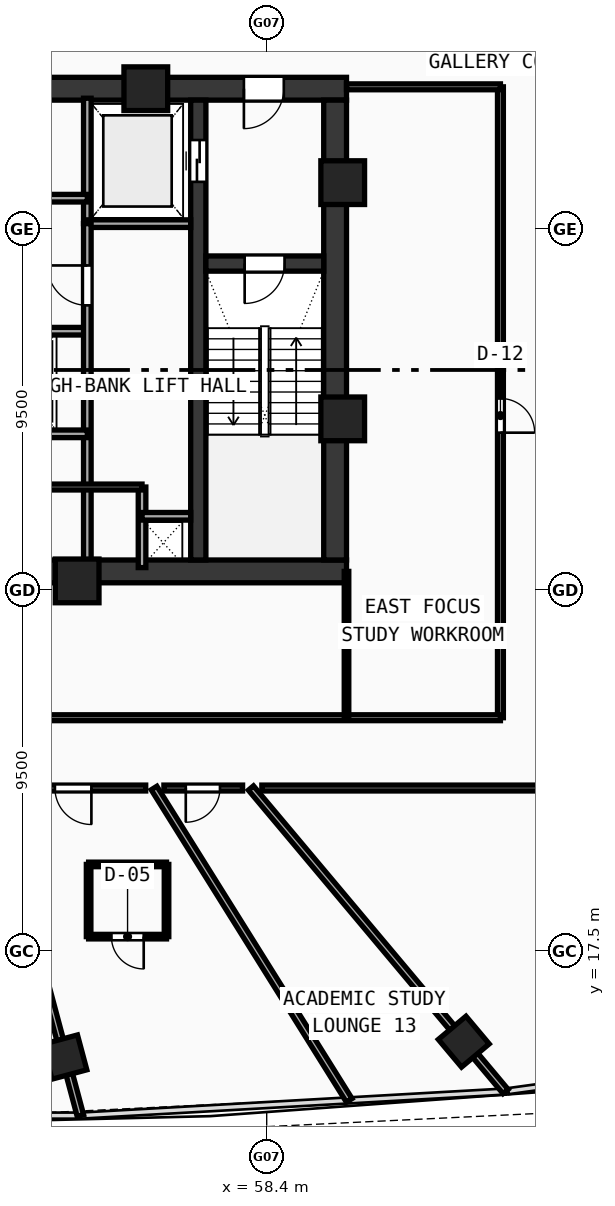
"""IFC4 building model, lengths in metres.
Left out: names, types, materials, properties, quantities, classifications, styles, units other than length and angle.
Written with IfcOpenShell. Run it as: python <this file> out.ifc"""

import sys

from ifc_helpers import new_model, si_unit, direction, frame, frame_2d, origin, origin_with_axes, origin_2d, place, context, subcontext, project, spatial, rectangle, hollow_rectangle, extrude, source, transform, mapped, element, fill, save


model = new_model("IFC4")
c1 = context("Model", 3, precision=1e-05, world=origin(), true_north=direction((0.0, 1.0)))
c2 = subcontext(c1, "Body", "Model", "MODEL_VIEW")
j1 = project(units=[si_unit("LENGTHUNIT", "METRE"), si_unit("PLANEANGLEUNIT", "RADIAN")], contexts=[c1])
p1 = place(None, origin())
s1 = spatial("IfcSite", under=j1, at=p1, CompositionType="ELEMENT")
p2 = place(p1, origin())
s2 = spatial("IfcBuilding", under=s1, at=p2, CompositionType="ELEMENT")
p3 = place(p2, frame((0.0, 0.0, 140.87)))
s3 = spatial("IfcBuildingStorey", under=s2, at=p3, CompositionType="ELEMENT", Elevation=140.87)
p4 = place(p3, frame((35.5, 27.5, 0.0), z_axis=(0.0, 0.0, 1.0), x_axis=(1.0, 0.0, 0.0)))
e1 = element("IfcWall", 1, at=p4, inside=s3, PredefinedType="SHEAR", context=c2, shape_type="SweptSolid", body=[
    extrude(rectangle(XDim=25.0, YDim=0.6, at=frame_2d((12.5, 0.0))), origin(), (0.0, 0.0, 1.0), 3.42),
])
p5 = place(p3, frame((49.2, 40.2, 0.0), z_axis=(0.0, 0.0, 1.0), x_axis=(1.0, 0.0, 0.0)))
e2 = element("IfcWall", 2, at=p5, inside=s3, PredefinedType="SHEAR", context=c2, shape_type="SweptSolid", body=[
    extrude(rectangle(XDim=11.3, YDim=0.6, at=frame_2d((5.65, 0.0))), origin(), (0.0, 0.0, 1.0), 3.42),
])
p6 = place(p5, frame((8.6, 0.0, 0.0)))
e3 = element("IfcOpeningElement", 3, at=p6, cuts=e2, PredefinedType="OPENING", context=c2, shape_type="SweptSolid", body=[
    extrude(rectangle(XDim=1.05, YDim=2.1, at=frame_2d((0.525, 1.05))), frame((0.0, 0.31, 0.0), z_axis=(0.0, -1.0, 0.0), x_axis=(1.0, 0.0, 0.0)), (0.0, 0.0, 1.0), 0.62),
])
p7 = place(p3, frame((60.2, 27.8, 0.0), z_axis=(0.0, 0.0, 1.0), x_axis=(0.0, 1.0, 0.0)))
e4 = element("IfcWall", 4, at=p7, inside=s3, PredefinedType="SHEAR", context=c2, shape_type="SweptSolid", body=[
    extrude(rectangle(XDim=12.1, YDim=0.6, at=frame_2d((6.05, 0.0))), origin(), (0.0, 0.0, 1.0), 3.42),
])
p8 = place(p3, frame((56.6, 27.8, 0.0), z_axis=(0.0, 0.0, 1.0), x_axis=(0.0, 1.0, 0.0)))
e5 = element("IfcWall", 5, at=p8, inside=s3, PredefinedType="SHEAR", context=c2, shape_type="SweptSolid", body=[
    extrude(rectangle(XDim=12.1, YDim=0.4, at=frame_2d((6.05, 0.0))), origin(), (0.0, 0.0, 1.0), 3.42),
])
p9 = place(p8, frame((9.95, 0.0, 0.0)))
e6 = element("IfcOpeningElement", 6, at=p9, cuts=e5, PredefinedType="OPENING", context=c2, shape_type="SweptSolid", body=[
    extrude(rectangle(XDim=1.1, YDim=2.1, at=frame_2d((0.55, 1.05))), frame((0.0, 0.21, 0.0), z_axis=(0.0, -1.0, 0.0), x_axis=(1.0, 0.0, 0.0)), (0.0, 0.0, 1.0), 0.42),
])
p10 = place(p3, frame((56.8, 35.6, 0.0), z_axis=(0.0, 0.0, 1.0), x_axis=(1.0, 0.0, 0.0)))
e7 = element("IfcWall", 7, at=p10, inside=s3, PredefinedType="SHEAR", context=c2, shape_type="SweptSolid", body=[
    extrude(rectangle(XDim=3.1, YDim=0.4, at=frame_2d((1.55, 0.0))), origin(), (0.0, 0.0, 1.0), 3.42),
])
p11 = place(p10, frame((1.02, 0.0, 0.0)))
e8 = element("IfcOpeningElement", 8, at=p11, cuts=e7, PredefinedType="OPENING", context=c2, shape_type="SweptSolid", body=[
    extrude(rectangle(XDim=1.05, YDim=2.1, at=frame_2d((0.525, 1.05))), frame((0.0, 0.21, 0.0), z_axis=(0.0, -1.0, 0.0), x_axis=(1.0, 0.0, 0.0)), (0.0, 0.0, 1.0), 0.42),
])
m1 = source(origin(), c2, "Body", "SweptSolid", [
    extrude(hollow_rectangle(XDim=1.15, YDim=1.15, WallThickness=0.048, at=origin_2d()), origin(), (0.0, 0.0, 1.0), 3.68),
])
for number, where, z_axis, x_axis in (
    (9, (53.412, 27.25, -0.26), (0.0, 0.0, 1.0), (1.0, 0.0, 0.0)),
    (10, (60.4, 31.513, -0.26), (0.0, 0.0, 1.0), (1.0, 0.0, 0.0)),
    (11, (60.4, 37.729, -0.26), (0.0, 0.0, 1.0), (1.0, 0.0, 0.0)),
    (12, (55.219, 40.2, -0.26), (0.0, 0.0, 1.0), (1.0, 0.0, 0.0)),
):
    element("IfcColumn", number, at=place(p3, frame(where, z_axis=z_axis, x_axis=x_axis)), inside=s3, PredefinedType="COLUMN", context=c2, shape_type="MappedRepresentation", body=[
        mapped(m1, transform((0.0, 0.0, 0.0), scale=1.0)),
    ])
m2 = source(origin(), c2, "Body", "SweptSolid", [
    extrude(hollow_rectangle(XDim=0.95, YDim=0.95, WallThickness=0.04, at=origin_2d()), origin(), (0.0, 0.0, 1.0), 3.68),
])
for number, where, z_axis, x_axis in (
    (13, (53.085, 14.722, -0.26), (0.0, 0.0, 1.0), (0.966, 0.259, 0.0)),
    (14, (63.585, 15.126, -0.26), (0.0, 0.0, 1.0), (0.766, 0.643, 0.0)),
):
    element("IfcColumn", number, at=place(p3, frame(where, z_axis=z_axis, x_axis=x_axis)), inside=s3, PredefinedType="COLUMN", context=c2, shape_type="MappedRepresentation", body=[
        mapped(m2, transform((0.0, 0.0, 0.0), scale=1.0)),
    ])
p12 = place(p3, frame((53.68, 36.65, 0.0), z_axis=(0.0, 0.0, 1.0), x_axis=(0.0, 1.0, 0.0)))
e15 = element("IfcWall", 15, at=p12, inside=s3, PredefinedType="SOLIDWALL", context=c2, shape_type="SweptSolid", body=[
    extrude(rectangle(XDim=3.3, YDim=0.2, at=frame_2d((1.65, 0.0))), origin(), (0.0, 0.0, 1.0), 3.42),
])
p13 = place(p3, frame((53.68, 36.65, 0.0), z_axis=(0.0, 0.0, 1.0), x_axis=(1.0, 0.0, 0.0)))
e16 = element("IfcWall", 16, at=p13, inside=s3, PredefinedType="SOLIDWALL", context=c2, shape_type="SweptSolid", body=[
    extrude(rectangle(XDim=2.72, YDim=0.2, at=frame_2d((1.36, 0.0))), origin(), (0.0, 0.0, 1.0), 3.42),
])
p14 = place(p3, frame((48.95, 37.32, 0.0), z_axis=(0.0, 0.0, 1.0), x_axis=(1.0, 0.0, 0.0)))
e17 = element("IfcWall", 17, at=p14, inside=s3, PredefinedType="SOLIDWALL", context=c2, shape_type="SweptSolid", body=[
    extrude(rectangle(XDim=4.73, YDim=0.2, at=frame_2d((2.365, 0.0))), origin(), (0.0, 0.0, 1.0), 3.42),
])
p15 = place(p14, frame((1.8, 0.0, 0.0)))
e18 = element("IfcOpeningElement", 18, at=p15, cuts=e17, PredefinedType="OPENING", context=c2, shape_type="SweptSolid", body=[
    extrude(rectangle(XDim=0.9, YDim=2.1, at=frame_2d((0.45, 1.05))), frame((0.0, 0.11, 0.0), z_axis=(0.0, -1.0, 0.0), x_axis=(1.0, 0.0, 0.0)), (0.0, 0.0, 1.0), 0.22),
])
p16 = place(p3, frame((43.85, 33.82, 0.0), z_axis=(0.0, 0.0, 1.0), x_axis=(1.0, 0.0, 0.0)))
e19 = element("IfcWall", 19, at=p16, inside=s3, PredefinedType="SOLIDWALL", context=c2, shape_type="SweptSolid", body=[
    extrude(rectangle(XDim=9.83, YDim=0.2, at=frame_2d((4.915, 0.0))), origin(), (0.0, 0.0, 1.0), 3.42),
])
p17 = place(p16, frame((0.575, 0.0, 0.0)))
e20 = element("IfcOpeningElement", 20, at=p17, cuts=e19, PredefinedType="OPENING", context=c2, shape_type="SweptSolid", body=[
    extrude(rectangle(XDim=1.05, YDim=2.1, at=frame_2d((0.525, 1.05))), frame((0.0, 0.11, 0.0), z_axis=(0.0, -1.0, 0.0), x_axis=(1.0, 0.0, 0.0)), (0.0, 0.0, 1.0), 0.22),
])
p18 = place(p16, frame((2.875, 0.0, 0.0)))
e21 = element("IfcOpeningElement", 21, at=p18, cuts=e19, PredefinedType="OPENING", context=c2, shape_type="SweptSolid", body=[
    extrude(rectangle(XDim=1.05, YDim=2.1, at=frame_2d((0.525, 1.05))), frame((0.0, 0.11, 0.0), z_axis=(0.0, -1.0, 0.0), x_axis=(1.0, 0.0, 0.0)), (0.0, 0.0, 1.0), 0.22),
])
p19 = place(p16, frame((5.175, 0.0, 0.0)))
e22 = element("IfcOpeningElement", 22, at=p19, cuts=e19, PredefinedType="OPENING", context=c2, shape_type="SweptSolid", body=[
    extrude(rectangle(XDim=1.05, YDim=2.1, at=frame_2d((0.525, 1.05))), frame((0.0, 0.11, 0.0), z_axis=(0.0, -1.0, 0.0), x_axis=(1.0, 0.0, 0.0)), (0.0, 0.0, 1.0), 0.22),
])
p20 = place(p16, frame((7.475, 0.0, 0.0)))
e23 = element("IfcOpeningElement", 23, at=p20, cuts=e19, PredefinedType="OPENING", context=c2, shape_type="SweptSolid", body=[
    extrude(rectangle(XDim=1.05, YDim=2.1, at=frame_2d((0.525, 1.05))), frame((0.0, 0.11, 0.0), z_axis=(0.0, -1.0, 0.0), x_axis=(1.0, 0.0, 0.0)), (0.0, 0.0, 1.0), 0.22),
])
p21 = place(p3, frame((53.68, 27.6, 0.0), z_axis=(0.0, 0.0, 1.0), x_axis=(0.0, 1.0, 0.0)))
e24 = element("IfcWall", 24, at=p21, inside=s3, PredefinedType="SOLIDWALL", context=c2, shape_type="SweptSolid", body=[
    extrude(rectangle(XDim=9.05, YDim=0.2, at=frame_2d((4.525, 0.0))), origin(), (0.0, 0.0, 1.0), 3.42),
])
p22 = place(p21, frame((6.9, 0.0, 0.0)))
e25 = element("IfcOpeningElement", 25, at=p22, cuts=e24, PredefinedType="OPENING", context=c2, shape_type="SweptSolid", body=[
    extrude(rectangle(XDim=1.05, YDim=2.1, at=frame_2d((0.525, 1.05))), frame((0.0, 0.11, 0.0), z_axis=(0.0, -1.0, 0.0), x_axis=(1.0, 0.0, 0.0)), (0.0, 0.0, 1.0), 0.22),
])
p23 = place(p3, frame((43.85, 31.12, 0.0), z_axis=(0.0, 0.0, 1.0), x_axis=(1.0, 0.0, 0.0)))
e26 = element("IfcWall", 26, at=p23, inside=s3, PredefinedType="SOLIDWALL", context=c2, shape_type="SweptSolid", body=[
    extrude(rectangle(XDim=9.83, YDim=0.2, at=frame_2d((4.915, 0.0))), origin(), (0.0, 0.0, 1.0), 3.42),
])
p24 = place(p3, frame((55.12, 27.6, 0.0), z_axis=(0.0, 0.0, 1.0), x_axis=(0.0, 1.0, 0.0)))
e27 = element("IfcWall", 27, at=p24, inside=s3, PredefinedType="SOLIDWALL", context=c2, shape_type="SweptSolid", body=[
    extrude(rectangle(XDim=2.12, YDim=0.2, at=frame_2d((1.06, 0.0))), origin(), (0.0, 0.0, 1.0), 3.42),
])
p25 = place(p3, frame((55.12, 28.95, 0.0), z_axis=(0.0, 0.0, 1.0), x_axis=(1.0, 0.0, 0.0)))
e28 = element("IfcWall", 28, at=p25, inside=s3, PredefinedType="SOLIDWALL", context=c2, shape_type="SweptSolid", body=[
    extrude(rectangle(XDim=1.28, YDim=0.2, at=frame_2d((0.64, 0.0))), origin(), (0.0, 0.0, 1.0), 3.42),
])
p26 = place(p3, frame((51.05, 29.72, 0.0), z_axis=(0.0, 0.0, 1.0), x_axis=(1.0, 0.0, 0.0)))
e29 = element("IfcWall", 29, at=p26, inside=s3, PredefinedType="PARTITIONING", context=c2, shape_type="SweptSolid", body=[
    extrude(rectangle(XDim=4.07, YDim=0.155, at=frame_2d((2.035, 0.0))), origin(), (0.0, 0.0, 1.0), 3.42),
])
p27 = place(p26, frame((0.5, 0.0, 0.0)))
e30 = element("IfcOpeningElement", 30, at=p27, cuts=e29, PredefinedType="OPENING", context=c2, shape_type="SweptSolid", body=[
    extrude(rectangle(XDim=0.9, YDim=2.1, at=frame_2d((0.45, 1.05))), frame((0.0, 0.087, 0.0), z_axis=(0.0, -1.0, 0.0), x_axis=(1.0, 0.0, 0.0)), (0.0, 0.0, 1.0), 0.175),
])
p28 = place(p3, frame((64.55, 23.65, 0.0), z_axis=(0.0, 0.0, 1.0), x_axis=(0.0, 1.0, 0.0)))
e31 = element("IfcWall", 31, at=p28, inside=s3, PredefinedType="PARTITIONING", context=c2, shape_type="SweptSolid", body=[
    extrude(rectangle(XDim=16.6, YDim=0.155, at=frame_2d((8.3, 0.0))), origin(), (0.0, 0.0, 1.0), 2.77),
])
p29 = place(p28, frame((7.5, 0.0, 0.0)))
e32 = element("IfcOpeningElement", 32, at=p29, cuts=e31, PredefinedType="OPENING", context=c2, shape_type="SweptSolid", body=[
    extrude(rectangle(XDim=0.9, YDim=2.08, at=frame_2d((0.45, 1.04))), frame((0.0, 0.087, 0.0), z_axis=(0.0, -1.0, 0.0), x_axis=(1.0, 0.0, 0.0)), (0.0, 0.0, 1.0), 0.175),
])
p30 = place(p3, frame((31.45, 23.65, 0.0), z_axis=(0.0, 0.0, 1.0), x_axis=(1.0, 0.0, 0.0)))
e33 = element("IfcWall", 33, at=p30, inside=s3, PredefinedType="PARTITIONING", context=c2, shape_type="SweptSolid", body=[
    extrude(rectangle(XDim=33.1, YDim=0.155, at=frame_2d((16.55, 0.0))), origin(), (0.0, 0.0, 1.0), 2.77),
])
p31 = place(p30, frame((16.0, 0.0, 0.0)))
e34 = element("IfcOpeningElement", 34, at=p31, cuts=e33, PredefinedType="OPENING", context=c2, shape_type="SweptSolid", body=[
    extrude(rectangle(XDim=0.92, YDim=2.1, at=frame_2d((0.46, 1.05))), frame((0.0, 0.087, 0.0), z_axis=(0.0, -1.0, 0.0), x_axis=(1.0, 0.0, 0.0)), (0.0, 0.0, 1.0), 0.175),
])
p32 = place(p3, frame((60.5, 40.25, 0.0), z_axis=(0.0, 0.0, 1.0), x_axis=(1.0, 0.0, 0.0)))
e35 = element("IfcWall", 35, at=p32, inside=s3, PredefinedType="PARTITIONING", context=c2, shape_type="SweptSolid", body=[
    extrude(rectangle(XDim=4.05, YDim=0.155, at=frame_2d((2.025, 0.0))), origin(), (0.0, 0.0, 1.0), 3.42),
])
p33 = place(p3, frame((60.5, 23.65, 0.0), z_axis=(0.0, 0.0, 1.0), x_axis=(0.0, 1.0, 0.0)))
e36 = element("IfcWall", 36, at=p33, inside=s3, PredefinedType="PARTITIONING", context=c2, shape_type="SweptSolid", body=[
    extrude(rectangle(XDim=3.85, YDim=0.12, at=frame_2d((1.925, 0.0))), origin(), (0.0, 0.0, 1.0), 3.02),
])
p34 = place(p3, frame((51.189, 21.8, 0.0), z_axis=(0.0, 0.0, 1.0), x_axis=(0.258794890482, -0.965932298177, 0.0)))
e37 = element("IfcWall", 37, at=p34, inside=s3, PredefinedType="PARTITIONING", context=c2, shape_type="SweptSolid", body=[
    extrude(rectangle(XDim=8.923, YDim=0.175, at=frame_2d((4.462, 0.0))), origin(), (0.0, 0.0, 1.0), 2.77),
])
p35 = place(p3, frame((55.436, 21.8, 0.0), z_axis=(0.0, 0.0, 1.0), x_axis=(0.529931002604, -0.848040761096, 0.0)))
e38 = element("IfcWall", 38, at=p35, inside=s3, PredefinedType="PARTITIONING", context=c2, shape_type="SweptSolid", body=[
    extrude(rectangle(XDim=9.691, YDim=0.175, at=frame_2d((4.845, 0.0))), origin(), (0.0, 0.0, 1.0), 2.77),
])
p36 = place(p3, frame((57.985, 21.8, 0.0), z_axis=(0.0, 0.0, 1.0), x_axis=(0.642781677101, -0.76604942111, 0.0)))
e39 = element("IfcWall", 39, at=p36, inside=s3, PredefinedType="PARTITIONING", context=c2, shape_type="SweptSolid", body=[
    extrude(rectangle(XDim=10.424, YDim=0.175, at=frame_2d((5.212, 0.0))), origin(), (0.0, 0.0, 1.0), 2.77),
])
p37 = place(p3, frame((66.4, 21.8, 0.0), z_axis=(0.0, 0.0, 1.0), x_axis=(-1.0, 0.0, 0.0)))
e40 = element("IfcWall", 40, at=p37, inside=s3, PredefinedType="PARTITIONING", context=c2, shape_type="SweptSolid", body=[
    extrude(rectangle(XDim=8.127, YDim=0.155, at=frame_2d((4.064, 0.0))), origin(), (0.0, 0.0, 1.0), 3.02),
])
p38 = place(p3, frame((57.765, 21.8, 0.0), z_axis=(0.0, 0.0, 1.0), x_axis=(-1.0, 0.0, 0.0)))
e41 = element("IfcWall", 41, at=p38, inside=s3, PredefinedType="PARTITIONING", context=c2, shape_type="SweptSolid", body=[
    extrude(rectangle(XDim=2.07, YDim=0.155, at=frame_2d((1.035, 0.0))), origin(), (0.0, 0.0, 1.0), 2.77),
])
p39 = place(p38, frame((0.595, 0.0, 0.0)))
e42 = element("IfcOpeningElement", 42, at=p39, cuts=e41, PredefinedType="OPENING", context=c2, shape_type="SweptSolid", body=[
    extrude(rectangle(XDim=0.9, YDim=2.08, at=frame_2d((0.45, 1.04))), frame((0.0, 0.087, 0.0), z_axis=(0.0, -1.0, 0.0), x_axis=(1.0, 0.0, 0.0)), (0.0, 0.0, 1.0), 0.175),
])
p40 = place(p3, frame((55.216, 21.8, 0.0), z_axis=(0.0, 0.0, 1.0), x_axis=(-1.0, 0.0, 0.0)))
e43 = element("IfcWall", 43, at=p40, inside=s3, PredefinedType="PARTITIONING", context=c2, shape_type="SweptSolid", body=[
    extrude(rectangle(XDim=3.8, YDim=0.155, at=frame_2d((1.9, 0.0))), origin(), (0.0, 0.0, 1.0), 3.42),
])
p41 = place(p40, frame((1.429, 0.0, 0.0)))
e44 = element("IfcOpeningElement", 44, at=p41, cuts=e43, PredefinedType="OPENING", context=c2, shape_type="SweptSolid", body=[
    extrude(rectangle(XDim=0.96, YDim=2.12, at=frame_2d((0.48, 1.06))), frame((0.0, 0.087, 0.0), z_axis=(0.0, -1.0, 0.0), x_axis=(1.0, 0.0, 0.0)), (0.0, 0.0, 1.0), 0.175),
])
p42 = place(p3, frame((53.714, 17.89, 0.0), z_axis=(0.0, 0.0, 1.0), x_axis=(1.0, 0.0, 0.0)))
e45 = element("IfcWall", 45, at=p42, inside=s3, PredefinedType="PARTITIONING", context=c2, shape_type="SweptSolid", body=[
    extrude(rectangle(XDim=2.05, YDim=0.12, at=frame_2d((1.025, 0.0))), origin(), (0.0, 0.0, 1.0), 3.42),
])
p43 = place(p42, frame((0.6, 0.0, 0.0)))
e46 = element("IfcOpeningElement", 46, at=p43, cuts=e45, PredefinedType="OPENING", context=c2, shape_type="SweptSolid", body=[
    extrude(rectangle(XDim=0.85, YDim=2.1, at=frame_2d((0.425, 1.05))), frame((0.0, 0.07, 0.0), z_axis=(0.0, -1.0, 0.0), x_axis=(1.0, 0.0, 0.0)), (0.0, 0.0, 1.0), 0.14),
])
p44 = place(p3, frame((55.764, 17.89, 0.0), z_axis=(0.0, 0.0, 1.0), x_axis=(0.0, 1.0, 0.0)))
e47 = element("IfcWall", 47, at=p44, inside=s3, PredefinedType="PARTITIONING", context=c2, shape_type="SweptSolid", body=[
    extrude(rectangle(XDim=1.9, YDim=0.12, at=frame_2d((0.95, 0.0))), origin(), (0.0, 0.0, 1.0), 3.02),
])
p45 = place(p3, frame((55.764, 19.79, 0.0), z_axis=(0.0, 0.0, 1.0), x_axis=(-1.0, 0.0, 0.0)))
e48 = element("IfcWall", 48, at=p45, inside=s3, PredefinedType="PARTITIONING", context=c2, shape_type="SweptSolid", body=[
    extrude(rectangle(XDim=2.05, YDim=0.12, at=frame_2d((1.025, 0.0))), origin(), (0.0, 0.0, 1.0), 3.42),
])
p46 = place(p3, frame((53.714, 19.79, 0.0), z_axis=(0.0, 0.0, 1.0), x_axis=(0.0, -1.0, 0.0)))
e49 = element("IfcWall", 49, at=p46, inside=s3, PredefinedType="PARTITIONING", context=c2, shape_type="SweptSolid", body=[
    extrude(rectangle(XDim=1.9, YDim=0.12, at=frame_2d((0.95, 0.0))), origin(), (0.0, 0.0, 1.0), 3.02),
])
m3 = source(origin(), c2, "Body", "SweptSolid", [
    extrude(rectangle(XDim=1.05, YDim=2.1, at=frame_2d((0.525, 1.05))), frame((0.0, 0.025, 0.0), z_axis=(0.0, -1.0, 0.0), x_axis=(1.0, 0.0, 0.0)), (0.0, 0.0, 1.0), 0.05),
])
p47 = place(p11, frame((1.05, 0.0, 0.0), z_axis=(0.0, 0.0, 1.0), x_axis=(-1.0, 0.0, 0.0)))
e50 = element("IfcDoor", 50, at=p47, inside=s3, OperationType="SINGLE_SWING_RIGHT", PredefinedType="DOOR", context=c2, shape_type="MappedRepresentation", body=[
    mapped(m3, transform((0.0, 0.0, 0.0), scale=1.0)),
])
fill(e8, e50)
p48 = place(p6, frame((1.05, 0.0, 0.0), z_axis=(0.0, 0.0, 1.0), x_axis=(-1.0, 0.0, 0.0)))
e51 = element("IfcDoor", 51, at=p48, inside=s3, OperationType="SINGLE_SWING_RIGHT", PredefinedType="DOOR", context=c2, shape_type="MappedRepresentation", body=[
    mapped(m3, transform((0.0, 0.0, 0.0), scale=1.0)),
])
fill(e3, e51)
m4 = source(origin(), c2, "Body", "SweptSolid", [
    extrude(rectangle(XDim=1.1, YDim=2.1, at=frame_2d((0.55, 1.05))), frame((0.0, 0.025, 0.0), z_axis=(0.0, -1.0, 0.0), x_axis=(1.0, 0.0, 0.0)), (0.0, 0.0, 1.0), 0.05),
])
p49 = place(p9, origin_with_axes())
e52 = element("IfcDoor", 52, at=p49, inside=s3, OperationType="DOUBLE_DOOR_SLIDING", PredefinedType="DOOR", context=c2, shape_type="MappedRepresentation", body=[
    mapped(m4, transform((0.0, 0.0, 0.0), scale=1.0)),
])
fill(e6, e52)
p50 = place(p22, origin_with_axes())
e53 = element("IfcDoor", 53, at=p50, inside=s3, OperationType="SINGLE_SWING_RIGHT", PredefinedType="DOOR", context=c2, shape_type="MappedRepresentation", body=[
    mapped(m3, transform((0.0, 0.0, 0.0), scale=1.0)),
])
fill(e25, e53)
m5 = source(origin(), c2, "Body", "SweptSolid", [
    extrude(rectangle(XDim=0.9, YDim=2.08, at=frame_2d((0.45, 1.04))), frame((0.0, 0.025, 0.0), z_axis=(0.0, -1.0, 0.0), x_axis=(1.0, 0.0, 0.0)), (0.0, 0.0, 1.0), 0.05),
])
p51 = place(p29, frame((0.9, 0.0, 0.0), z_axis=(0.0, 0.0, 1.0), x_axis=(-1.0, 0.0, 0.0)))
e54 = element("IfcDoor", 54, at=p51, inside=s3, OperationType="SINGLE_SWING_RIGHT", PredefinedType="DOOR", context=c2, shape_type="MappedRepresentation", body=[
    mapped(m5, transform((0.0, 0.0, 0.0), scale=1.0)),
])
fill(e32, e54)
m6 = source(origin(), c2, "Body", "SweptSolid", [
    extrude(rectangle(XDim=0.96, YDim=2.12, at=frame_2d((0.48, 1.06))), frame((0.0, 0.025, 0.0), z_axis=(0.0, -1.0, 0.0), x_axis=(1.0, 0.0, 0.0)), (0.0, 0.0, 1.0), 0.05),
])
p52 = place(p41, origin_with_axes())
e55 = element("IfcDoor", 55, at=p52, inside=s3, OperationType="SINGLE_SWING_LEFT", PredefinedType="DOOR", context=c2, shape_type="MappedRepresentation", body=[
    mapped(m6, transform((0.0, 0.0, 0.0), scale=1.0)),
])
fill(e44, e55)
m7 = source(origin(), c2, "Body", "SweptSolid", [
    extrude(rectangle(XDim=0.85, YDim=2.1, at=frame_2d((0.425, 1.05))), frame((0.0, 0.025, 0.0), z_axis=(0.0, -1.0, 0.0), x_axis=(1.0, 0.0, 0.0)), (0.0, 0.0, 1.0), 0.05),
])
p53 = place(p43, frame((0.85, 0.0, 0.0), z_axis=(0.0, 0.0, 1.0), x_axis=(-1.0, 0.0, 0.0)))
e56 = element("IfcDoor", 56, at=p53, inside=s3, OperationType="SINGLE_SWING_LEFT", PredefinedType="DOOR", context=c2, shape_type="MappedRepresentation", body=[
    mapped(m7, transform((0.0, 0.0, 0.0), scale=1.0)),
])
fill(e46, e56)
p54 = place(p39, origin_with_axes())
e57 = element("IfcDoor", 57, at=p54, inside=s3, OperationType="SINGLE_SWING_RIGHT", PredefinedType="DOOR", context=c2, shape_type="MappedRepresentation", body=[
    mapped(m5, transform((0.0, 0.0, 0.0), scale=1.0)),
])
fill(e42, e57)
save(model, sys.argv[1])
